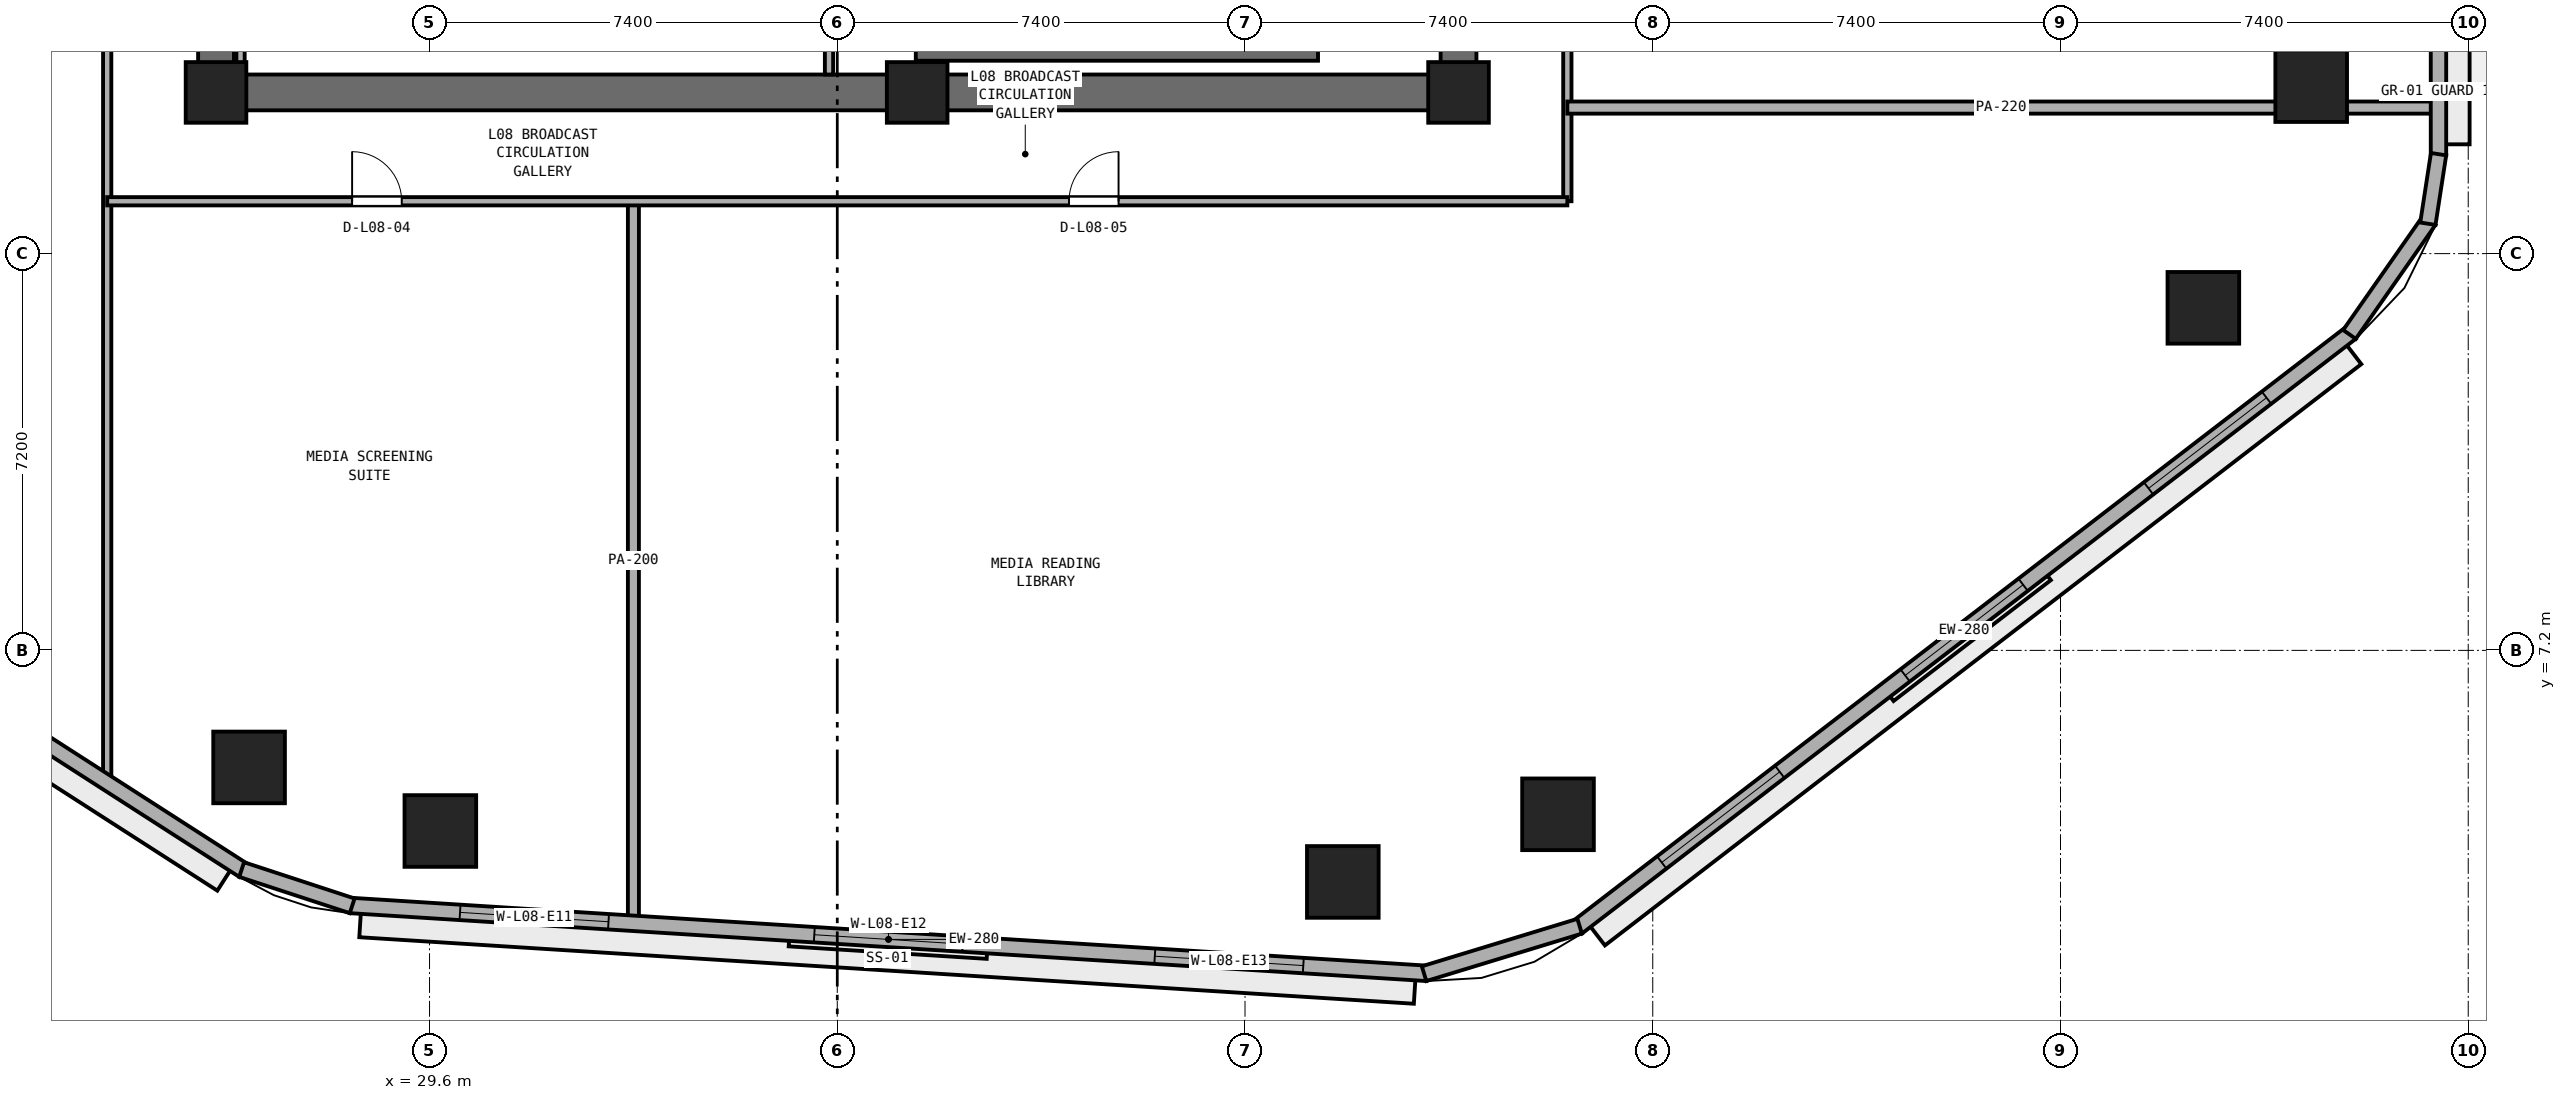
"""IFC4 building model, lengths in metres.
Left out: names, types, materials, properties, quantities, classifications, styles, units other than length and angle.
Written with IfcOpenShell. Run it as: python <this file> out.ifc"""

import sys

from ifc_helpers import new_model, si_unit, direction, frame, frame_2d, origin, origin_2d, place, context, subcontext, project, spatial, rectangle, extrude, element, fill, save


model = new_model("IFC4")
c1 = context("Model", 3, precision=1e-05, world=origin(), true_north=direction((0.0, 1.0)))
c2 = subcontext(c1, "Body", "Model", "MODEL_VIEW")
j1 = project(units=[si_unit("LENGTHUNIT", "METRE"), si_unit("PLANEANGLEUNIT", "RADIAN")], contexts=[c1])
p1 = place(None, origin())
s1 = spatial("IfcSite", under=j1, at=p1, CompositionType="ELEMENT")
p2 = place(p1, origin())
s2 = spatial("IfcBuilding", under=s1, at=p2, CompositionType="ELEMENT")
p3 = place(p2, frame((0.0, 0.0, 36.4)))
s3 = spatial("IfcBuildingStorey", under=s2, at=p3, CompositionType="ELEMENT", Elevation=36.4)
p4 = place(p3, frame((25.4, 17.325, 0.0), z_axis=(0.0, 0.0, 1.0), x_axis=(1.0, 0.0, 0.0)))
e1 = element("IfcWall", 1, at=p4, inside=s3, PredefinedType="SHEAR", context=c2, shape_type="SweptSolid", body=[
    extrude(rectangle(XDim=23.2, YDim=0.65, at=frame_2d((11.6, 0.0))), origin(), (0.0, 0.0, 1.0), 3.525),
])
p5 = place(p3, frame((25.725, 17.65, 0.0), z_axis=(0.0, 0.0, 1.0), x_axis=(0.0, 1.0, 0.0)))
e2 = element("IfcWall", 2, at=p5, inside=s3, PredefinedType="SHEAR", context=c2, shape_type="SweptSolid", body=[
    extrude(rectangle(XDim=15.1, YDim=0.65, at=frame_2d((7.55, 0.0))), origin(), (0.0, 0.0, 1.0), 3.525),
])
p6 = place(p5, frame((6.8, 0.0, 0.0)))
e3 = element("IfcOpeningElement", 3, at=p6, cuts=e2, PredefinedType="OPENING", context=c2, shape_type="SweptSolid", body=[
    extrude(rectangle(XDim=1.5, YDim=2.15, at=frame_2d((0.75, 1.075))), frame((0.0, 0.335, 0.0), z_axis=(0.0, -1.0, 0.0), x_axis=(1.0, 0.0, 0.0)), (0.0, 0.0, 1.0), 0.67),
])
p7 = place(p3, frame((48.275, 17.65, 0.0), z_axis=(0.0, 0.0, 1.0), x_axis=(0.0, 1.0, 0.0)))
e4 = element("IfcWall", 4, at=p7, inside=s3, PredefinedType="SHEAR", context=c2, shape_type="SweptSolid", body=[
    extrude(rectangle(XDim=15.1, YDim=0.65, at=frame_2d((7.55, 0.0))), origin(), (0.0, 0.0, 1.0), 3.525),
])
p8 = place(p7, frame((5.65, 0.0, 0.0)))
e5 = element("IfcOpeningElement", 5, at=p8, cuts=e4, PredefinedType="OPENING", context=c2, shape_type="SweptSolid", body=[
    extrude(rectangle(XDim=1.5, YDim=2.15, at=frame_2d((0.75, 1.075))), frame((0.0, 0.335, 0.0), z_axis=(0.0, -1.0, 0.0), x_axis=(1.0, 0.0, 0.0)), (0.0, 0.0, 1.0), 0.67),
])
for number, where, z_axis, x_axis in (
    (6, (25.725, 17.325, 0.0), (0.0, 0.0, 1.0), (1.0, 0.0, 0.0)),
    (7, (38.45, 17.325, 0.0), (0.0, 0.0, 1.0), (1.0, 0.0, 0.0)),
    (8, (48.275, 17.325, 0.0), (0.0, 0.0, 1.0), (1.0, 0.0, 0.0)),
):
    element("IfcColumn", number, at=place(p3, frame(where, z_axis=z_axis, x_axis=x_axis)), inside=s3, PredefinedType="PILASTER", context=c2, shape_type="SweptSolid", body=[
        extrude(rectangle(XDim=1.1, YDim=1.1, at=origin_2d()), origin(), (0.0, 0.0, 1.0), 3.8),
    ])
for number, where, z_axis, x_axis in (
    (9, (29.796, 3.922, 0.0), (0.0, 0.0, 1.0), (1.0, 0.0, 0.0)),
    (10, (46.175, 2.998, 0.0), (0.0, 0.0, 1.0), (1.0, 0.0, 0.0)),
    (11, (50.081, 4.225, 0.0), (0.0, 0.0, 1.0), (1.0, 0.0, 0.0)),
    (12, (61.793, 13.416, 0.0), (0.0, 0.0, 1.0), (1.0, 0.0, 0.0)),
    (13, (63.75, 17.44, 0.0), (0.0, 0.0, 1.0), (1.0, 0.0, 0.0)),
    (14, (26.325, 5.076, 0.0), (0.0, 0.0, 1.0), (1.0, 0.0, 0.0)),
):
    element("IfcColumn", number, at=place(p3, frame(where, z_axis=z_axis, x_axis=x_axis)), inside=s3, PredefinedType="COLUMN", context=c2, shape_type="SweptSolid", body=[
        extrude(rectangle(XDim=1.3, YDim=1.3, at=origin_2d()), origin(), (0.0, 0.0, 1.0), 3.8),
    ])
p9 = place(p3, frame((38.425, 18.025, 0.0), z_axis=(0.0, 0.0, 1.0), x_axis=(1.0, 0.0, 0.0)))
e15 = element("IfcWall", 15, at=p9, inside=s3, PredefinedType="SHEAR", context=c2, shape_type="SweptSolid", body=[
    extrude(rectangle(XDim=7.3, YDim=0.25, at=frame_2d((3.65, 0.0))), origin(), (0.0, 0.0, 1.0), 3.525),
])
for number, where, z_axis, x_axis in (
    (16, (26.17, 17.65, 0.0), (0.0, 0.0, 1.0), (0.0, 1.0, 0.0)),
    (17, (36.85, 17.65, 0.0), (0.0, 0.0, 1.0), (0.0, 1.0, 0.0)),
):
    element("IfcWall", number, at=place(p3, frame(where, z_axis=z_axis, x_axis=x_axis)), inside=s3, PredefinedType="PARTITIONING", context=c2, shape_type="SweptSolid", body=[
        extrude(rectangle(XDim=2.1, YDim=0.15, at=frame_2d((1.05, 0.0))), origin(), (0.0, 0.0, 1.0), 3.525),
    ])
p10 = place(p3, frame((50.25, 15.35, 0.0), z_axis=(0.0, 0.0, 1.0), x_axis=(0.0, 1.0, 0.0)))
e18 = element("IfcWall", 18, at=p10, inside=s3, PredefinedType="PARTITIONING", context=c2, shape_type="SweptSolid", body=[
    extrude(rectangle(XDim=19.7, YDim=0.15, at=frame_2d((9.85, 0.0))), origin(), (0.0, 0.0, 1.0), 3.525),
])
p11 = place(p10, frame((9.4, 0.0, 0.0)))
e19 = element("IfcOpeningElement", 19, at=p11, cuts=e18, PredefinedType="OPENING", context=c2, shape_type="SweptSolid", body=[
    extrude(rectangle(XDim=0.9, YDim=2.1, at=frame_2d((0.45, 1.05))), frame((0.0, 0.085, 0.0), z_axis=(0.0, -1.0, 0.0), x_axis=(1.0, 0.0, 0.0)), (0.0, 0.0, 1.0), 0.17),
])
p12 = place(p3, frame((33.3, 2.312, 0.0), z_axis=(0.0, 0.0, 1.0), x_axis=(0.0, 1.0, 0.0)))
e20 = element("IfcWall", 20, at=p12, inside=s3, PredefinedType="PARTITIONING", context=c2, shape_type="SweptSolid", body=[
    extrude(rectangle(XDim=13.038, YDim=0.2, at=frame_2d((6.519, 0.0))), origin(), (0.0, 0.0, 1.0), 3.525),
])
p13 = place(p3, frame((23.75, 4.769, 0.0), z_axis=(0.0, 0.0, 1.0), x_axis=(0.0, 1.0, 0.0)))
e21 = element("IfcWall", 21, at=p13, inside=s3, PredefinedType="PARTITIONING", context=c2, shape_type="SweptSolid", body=[
    extrude(rectangle(XDim=40.691, YDim=0.15, at=frame_2d((20.345, 0.0))), origin(), (0.0, 0.0, 1.0), 3.525),
])
p14 = place(p13, frame((14.006, 0.0, 0.0)))
e22 = element("IfcOpeningElement", 22, at=p14, cuts=e21, PredefinedType="OPENING", context=c2, shape_type="SweptSolid", body=[
    extrude(rectangle(XDim=0.9, YDim=2.1, at=frame_2d((0.45, 1.05))), frame((0.0, 0.085, 0.0), z_axis=(0.0, -1.0, 0.0), x_axis=(1.0, 0.0, 0.0)), (0.0, 0.0, 1.0), 0.17),
])
p15 = place(p13, frame((21.181, 0.0, 0.0)))
e23 = element("IfcOpeningElement", 23, at=p15, cuts=e21, PredefinedType="OPENING", context=c2, shape_type="SweptSolid", body=[
    extrude(rectangle(XDim=0.9, YDim=2.1, at=frame_2d((0.45, 1.05))), frame((0.0, 0.085, 0.0), z_axis=(0.0, -1.0, 0.0), x_axis=(1.0, 0.0, 0.0)), (0.0, 0.0, 1.0), 0.17),
])
p16 = place(p13, frame((27.156, 0.0, 0.0)))
e24 = element("IfcOpeningElement", 24, at=p16, cuts=e21, PredefinedType="OPENING", context=c2, shape_type="SweptSolid", body=[
    extrude(rectangle(XDim=0.9, YDim=2.1, at=frame_2d((0.45, 1.05))), frame((0.0, 0.085, 0.0), z_axis=(0.0, -1.0, 0.0), x_axis=(1.0, 0.0, 0.0)), (0.0, 0.0, 1.0), 0.17),
])
p17 = place(p3, frame((23.75, 15.35, 0.0), z_axis=(0.0, 0.0, 1.0), x_axis=(1.0, 0.0, 0.0)))
e25 = element("IfcWall", 25, at=p17, inside=s3, PredefinedType="PARTITIONING", context=c2, shape_type="SweptSolid", body=[
    extrude(rectangle(XDim=26.5, YDim=0.15, at=frame_2d((13.25, 0.0))), origin(), (0.0, 0.0, 1.0), 3.525),
])
p18 = place(p17, frame((4.445, 0.0, 0.0)))
e26 = element("IfcOpeningElement", 26, at=p18, cuts=e25, PredefinedType="OPENING", context=c2, shape_type="SweptSolid", body=[
    extrude(rectangle(XDim=0.9, YDim=2.1, at=frame_2d((0.45, 1.05))), frame((0.0, 0.085, 0.0), z_axis=(0.0, -1.0, 0.0), x_axis=(1.0, 0.0, 0.0)), (0.0, 0.0, 1.0), 0.17),
])
p19 = place(p17, frame((17.455, 0.0, 0.0)))
e27 = element("IfcOpeningElement", 27, at=p19, cuts=e25, PredefinedType="OPENING", context=c2, shape_type="SweptSolid", body=[
    extrude(rectangle(XDim=0.9, YDim=2.1, at=frame_2d((0.45, 1.05))), frame((0.0, 0.085, 0.0), z_axis=(0.0, -1.0, 0.0), x_axis=(1.0, 0.0, 0.0)), (0.0, 0.0, 1.0), 0.17),
])
p20 = place(p3, frame((50.25, 17.05, 0.0), z_axis=(0.0, 0.0, 1.0), x_axis=(1.0, 0.0, 0.0)))
e28 = element("IfcWall", 28, at=p20, inside=s3, PredefinedType="PARTITIONING", context=c2, shape_type="SweptSolid", body=[
    extrude(rectangle(XDim=15.745, YDim=0.22, at=frame_2d((7.873, 0.0))), origin(), (0.0, 0.0, 1.0), 3.525),
])
p21 = place(p3, frame((28.161, 2.571, 0.0), z_axis=(0.0, 0.0, 1.0), x_axis=(0.998017288298, -0.06294038654, 0.0)))
e29 = element("IfcWall", 29, at=p21, inside=s3, PredefinedType="STANDARD", context=c2, shape_type="SweptSolid", body=[
    extrude(rectangle(XDim=19.577, YDim=0.28, at=frame_2d((9.789, 0.0))), origin(), (0.0, 0.0, 1.0), 3.525),
])
p22 = place(p21, frame((1.996, 0.0, 0.9)))
e30 = element("IfcOpeningElement", 30, at=p22, cuts=e29, PredefinedType="OPENING", context=c2, shape_type="SweptSolid", body=[
    extrude(rectangle(XDim=2.7, YDim=1.75, at=frame_2d((1.35, 0.875))), frame((0.0, 0.15, 0.0), z_axis=(0.0, -1.0, 0.0), x_axis=(1.0, 0.0, 0.0)), (0.0, 0.0, 1.0), 0.3),
])
p23 = place(p21, frame((8.438, 0.0, 0.9)))
e31 = element("IfcOpeningElement", 31, at=p23, cuts=e29, PredefinedType="OPENING", context=c2, shape_type="SweptSolid", body=[
    extrude(rectangle(XDim=2.7, YDim=1.75, at=frame_2d((1.35, 0.875))), frame((0.0, 0.15, 0.0), z_axis=(0.0, -1.0, 0.0), x_axis=(1.0, 0.0, 0.0)), (0.0, 0.0, 1.0), 0.3),
])
p24 = place(p21, frame((14.631, 0.0, 0.9)))
e32 = element("IfcOpeningElement", 32, at=p24, cuts=e29, PredefinedType="OPENING", context=c2, shape_type="SweptSolid", body=[
    extrude(rectangle(XDim=2.7, YDim=1.75, at=frame_2d((1.35, 0.875))), frame((0.0, 0.15, 0.0), z_axis=(0.0, -1.0, 0.0), x_axis=(1.0, 0.0, 0.0)), (0.0, 0.0, 1.0), 0.3),
])
p25 = place(p3, frame((50.429, 2.172, 0.0), z_axis=(0.0, 0.0, 1.0), x_axis=(0.792937466367, 0.609303023488, 0.0)))
e33 = element("IfcWall", 33, at=p25, inside=s3, PredefinedType="STANDARD", context=c2, shape_type="SweptSolid", body=[
    extrude(rectangle(XDim=17.713, YDim=0.28, at=frame_2d((8.856, 0.0))), origin(), (0.0, 0.0, 1.0), 3.525),
])
p26 = place(p25, frame((1.936, 0.0, 0.9)))
e34 = element("IfcOpeningElement", 34, at=p26, cuts=e33, PredefinedType="OPENING", context=c2, shape_type="SweptSolid", body=[
    extrude(rectangle(XDim=2.7, YDim=1.75, at=frame_2d((1.35, 0.875))), frame((0.0, 0.15, 0.0), z_axis=(0.0, -1.0, 0.0), x_axis=(1.0, 0.0, 0.0)), (0.0, 0.0, 1.0), 0.3),
])
p27 = place(p25, frame((7.506, 0.0, 0.9)))
e35 = element("IfcOpeningElement", 35, at=p27, cuts=e33, PredefinedType="OPENING", context=c2, shape_type="SweptSolid", body=[
    extrude(rectangle(XDim=2.7, YDim=1.75, at=frame_2d((1.35, 0.875))), frame((0.0, 0.15, 0.0), z_axis=(0.0, -1.0, 0.0), x_axis=(1.0, 0.0, 0.0)), (0.0, 0.0, 1.0), 0.3),
])
p28 = place(p25, frame((13.077, 0.0, 0.9)))
e36 = element("IfcOpeningElement", 36, at=p28, cuts=e33, PredefinedType="OPENING", context=c2, shape_type="SweptSolid", body=[
    extrude(rectangle(XDim=2.7, YDim=1.75, at=frame_2d((1.35, 0.875))), frame((0.0, 0.15, 0.0), z_axis=(0.0, -1.0, 0.0), x_axis=(1.0, 0.0, 0.0)), (0.0, 0.0, 1.0), 0.3),
])
p29 = place(p3, frame((66.06, 16.183, 0.0), z_axis=(0.0, 0.0, 1.0), x_axis=(0.0, 1.0, 0.0)))
e37 = element("IfcWall", 37, at=p29, inside=s3, PredefinedType="STANDARD", context=c2, shape_type="SweptSolid", body=[
    extrude(rectangle(XDim=19.331, YDim=0.28, at=frame_2d((9.666, 0.0))), origin(), (0.0, 0.0, 1.0), 3.525),
])
p30 = place(p29, frame((9.115, 0.0, 0.0)))
e38 = element("IfcOpeningElement", 38, at=p30, cuts=e37, PredefinedType="OPENING", context=c2, shape_type="SweptSolid", body=[
    extrude(rectangle(XDim=1.1, YDim=2.2, at=frame_2d((0.55, 1.1))), frame((0.0, 0.15, 0.0), z_axis=(0.0, -1.0, 0.0), x_axis=(1.0, 0.0, 0.0)), (0.0, 0.0, 1.0), 0.3),
])
p31 = place(p29, frame((2.205, 0.0, 0.9)))
e39 = element("IfcOpeningElement", 39, at=p31, cuts=e37, PredefinedType="OPENING", context=c2, shape_type="SweptSolid", body=[
    extrude(rectangle(XDim=2.7, YDim=1.75, at=frame_2d((1.35, 0.875))), frame((0.0, 0.15, 0.0), z_axis=(0.0, -1.0, 0.0), x_axis=(1.0, 0.0, 0.0)), (0.0, 0.0, 1.0), 0.3),
])
p32 = place(p29, frame((14.176, 0.0, 0.9)))
e40 = element("IfcOpeningElement", 40, at=p32, cuts=e37, PredefinedType="OPENING", context=c2, shape_type="SweptSolid", body=[
    extrude(rectangle(XDim=2.7, YDim=1.75, at=frame_2d((1.35, 0.875))), frame((0.0, 0.15, 0.0), z_axis=(0.0, -1.0, 0.0), x_axis=(1.0, 0.0, 0.0)), (0.0, 0.0, 1.0), 0.3),
])
p33 = place(p3, frame((11.405, 12.728, 0.0), z_axis=(0.0, 0.0, 1.0), x_axis=(0.841304564637, -0.540561402175, 0.0)))
e41 = element("IfcWall", 41, at=p33, inside=s3, PredefinedType="STANDARD", context=c2, shape_type="SweptSolid", body=[
    extrude(rectangle(XDim=17.612, YDim=0.28, at=frame_2d((8.806, 0.0))), origin(), (0.0, 0.0, 1.0), 3.525),
])
p34 = place(p33, frame((1.919, 0.0, 0.9)))
e42 = element("IfcOpeningElement", 42, at=p34, cuts=e41, PredefinedType="OPENING", context=c2, shape_type="SweptSolid", body=[
    extrude(rectangle(XDim=2.7, YDim=1.75, at=frame_2d((1.35, 0.875))), frame((0.0, 0.15, 0.0), z_axis=(0.0, -1.0, 0.0), x_axis=(1.0, 0.0, 0.0)), (0.0, 0.0, 1.0), 0.3),
])
p35 = place(p33, frame((7.456, 0.0, 0.9)))
e43 = element("IfcOpeningElement", 43, at=p35, cuts=e41, PredefinedType="OPENING", context=c2, shape_type="SweptSolid", body=[
    extrude(rectangle(XDim=2.7, YDim=1.75, at=frame_2d((1.35, 0.875))), frame((0.0, 0.15, 0.0), z_axis=(0.0, -1.0, 0.0), x_axis=(1.0, 0.0, 0.0)), (0.0, 0.0, 1.0), 0.3),
])
p36 = place(p3, frame((47.65, 1.333, 0.0), z_axis=(0.0, 0.0, 1.0), x_axis=(0.956461287977, 0.291859220516, 0.0)))
e44 = element("IfcWall", 44, at=p36, inside=s3, PredefinedType="STANDARD", context=c2, shape_type="SweptSolid", body=[
    extrude(rectangle(XDim=2.952, YDim=0.28, at=frame_2d((1.476, 0.0))), origin(), (0.0, 0.0, 1.0), 3.525),
])
p37 = place(p3, frame((64.444, 12.933, 0.0), z_axis=(0.0, 0.0, 1.0), x_axis=(0.573176686443, 0.819431806875, 0.0)))
e45 = element("IfcWall", 45, at=p37, inside=s3, PredefinedType="STANDARD", context=c2, shape_type="SweptSolid", body=[
    extrude(rectangle(XDim=2.524, YDim=0.28, at=frame_2d((1.262, 0.0))), origin(), (0.0, 0.0, 1.0), 3.525),
])
p38 = place(p3, frame((65.867, 14.943, 0.0), z_axis=(0.0, 0.0, 1.0), x_axis=(0.152014078361, 0.988378328364, 0.0)))
e46 = element("IfcWall", 46, at=p38, inside=s3, PredefinedType="STANDARD", context=c2, shape_type="SweptSolid", body=[
    extrude(rectangle(XDim=1.277, YDim=0.28, at=frame_2d((0.638, 0.0))), origin(), (0.0, 0.0, 1.0), 3.525),
])
p39 = place(p3, frame((26.19, 3.223, 0.0), z_axis=(0.0, 0.0, 1.0), x_axis=(0.95016442175, -0.311749212734, 0.0)))
e47 = element("IfcWall", 47, at=p39, inside=s3, PredefinedType="STANDARD", context=c2, shape_type="SweptSolid", body=[
    extrude(rectangle(XDim=2.111, YDim=0.28, at=frame_2d((1.056, 0.0))), origin(), (0.0, 0.0, 1.0), 3.525),
])
p40 = place(p18, origin())
e48 = element("IfcDoor", 48, at=p40, inside=s3, OperationType="SINGLE_SWING_LEFT", PredefinedType="DOOR", context=c2, shape_type="SweptSolid", body=[
    extrude(rectangle(XDim=0.9, YDim=2.1, at=frame_2d((0.45, 1.05))), frame((0.0, 0.025, 0.0), z_axis=(0.0, -1.0, 0.0), x_axis=(1.0, 0.0, 0.0)), (0.0, 0.0, 1.0), 0.05),
])
fill(e26, e48)
p41 = place(p19, origin())
e49 = element("IfcDoor", 49, at=p41, inside=s3, OperationType="SINGLE_SWING_RIGHT", PredefinedType="DOOR", context=c2, shape_type="SweptSolid", body=[
    extrude(rectangle(XDim=0.9, YDim=2.1, at=frame_2d((0.45, 1.05))), frame((0.0, 0.025, 0.0), z_axis=(0.0, -1.0, 0.0), x_axis=(1.0, 0.0, 0.0)), (0.0, 0.0, 1.0), 0.05),
])
fill(e27, e49)
p42 = place(p22, origin())
e50 = element("IfcWindow", 50, at=p42, inside=s3, PartitioningType="SINGLE_PANEL", PredefinedType="WINDOW", context=c2, shape_type="SweptSolid", body=[
    extrude(rectangle(XDim=2.7, YDim=1.75, at=frame_2d((1.35, 0.875))), frame((0.0, 0.03, 0.0), z_axis=(0.0, -1.0, 0.0), x_axis=(1.0, 0.0, 0.0)), (0.0, 0.0, 1.0), 0.06),
])
fill(e30, e50)
p43 = place(p23, origin())
e51 = element("IfcWindow", 51, at=p43, inside=s3, PartitioningType="SINGLE_PANEL", PredefinedType="WINDOW", context=c2, shape_type="SweptSolid", body=[
    extrude(rectangle(XDim=2.7, YDim=1.75, at=frame_2d((1.35, 0.875))), frame((0.0, 0.03, 0.0), z_axis=(0.0, -1.0, 0.0), x_axis=(1.0, 0.0, 0.0)), (0.0, 0.0, 1.0), 0.06),
])
fill(e31, e51)
p44 = place(p24, origin())
e52 = element("IfcWindow", 52, at=p44, inside=s3, PartitioningType="SINGLE_PANEL", PredefinedType="WINDOW", context=c2, shape_type="SweptSolid", body=[
    extrude(rectangle(XDim=2.7, YDim=1.75, at=frame_2d((1.35, 0.875))), frame((0.0, 0.03, 0.0), z_axis=(0.0, -1.0, 0.0), x_axis=(1.0, 0.0, 0.0)), (0.0, 0.0, 1.0), 0.06),
])
fill(e32, e52)
p45 = place(p26, origin())
e53 = element("IfcWindow", 53, at=p45, inside=s3, PartitioningType="SINGLE_PANEL", PredefinedType="WINDOW", context=c2, shape_type="SweptSolid", body=[
    extrude(rectangle(XDim=2.7, YDim=1.75, at=frame_2d((1.35, 0.875))), frame((0.0, 0.03, 0.0), z_axis=(0.0, -1.0, 0.0), x_axis=(1.0, 0.0, 0.0)), (0.0, 0.0, 1.0), 0.06),
])
fill(e34, e53)
p46 = place(p27, origin())
e54 = element("IfcWindow", 54, at=p46, inside=s3, PartitioningType="SINGLE_PANEL", PredefinedType="WINDOW", context=c2, shape_type="SweptSolid", body=[
    extrude(rectangle(XDim=2.7, YDim=1.75, at=frame_2d((1.35, 0.875))), frame((0.0, 0.03, 0.0), z_axis=(0.0, -1.0, 0.0), x_axis=(1.0, 0.0, 0.0)), (0.0, 0.0, 1.0), 0.06),
])
fill(e35, e54)
p47 = place(p28, origin())
e55 = element("IfcWindow", 55, at=p47, inside=s3, PartitioningType="SINGLE_PANEL", PredefinedType="WINDOW", context=c2, shape_type="SweptSolid", body=[
    extrude(rectangle(XDim=2.7, YDim=1.75, at=frame_2d((1.35, 0.875))), frame((0.0, 0.03, 0.0), z_axis=(0.0, -1.0, 0.0), x_axis=(1.0, 0.0, 0.0)), (0.0, 0.0, 1.0), 0.06),
])
fill(e36, e55)
save(model, sys.argv[1])
